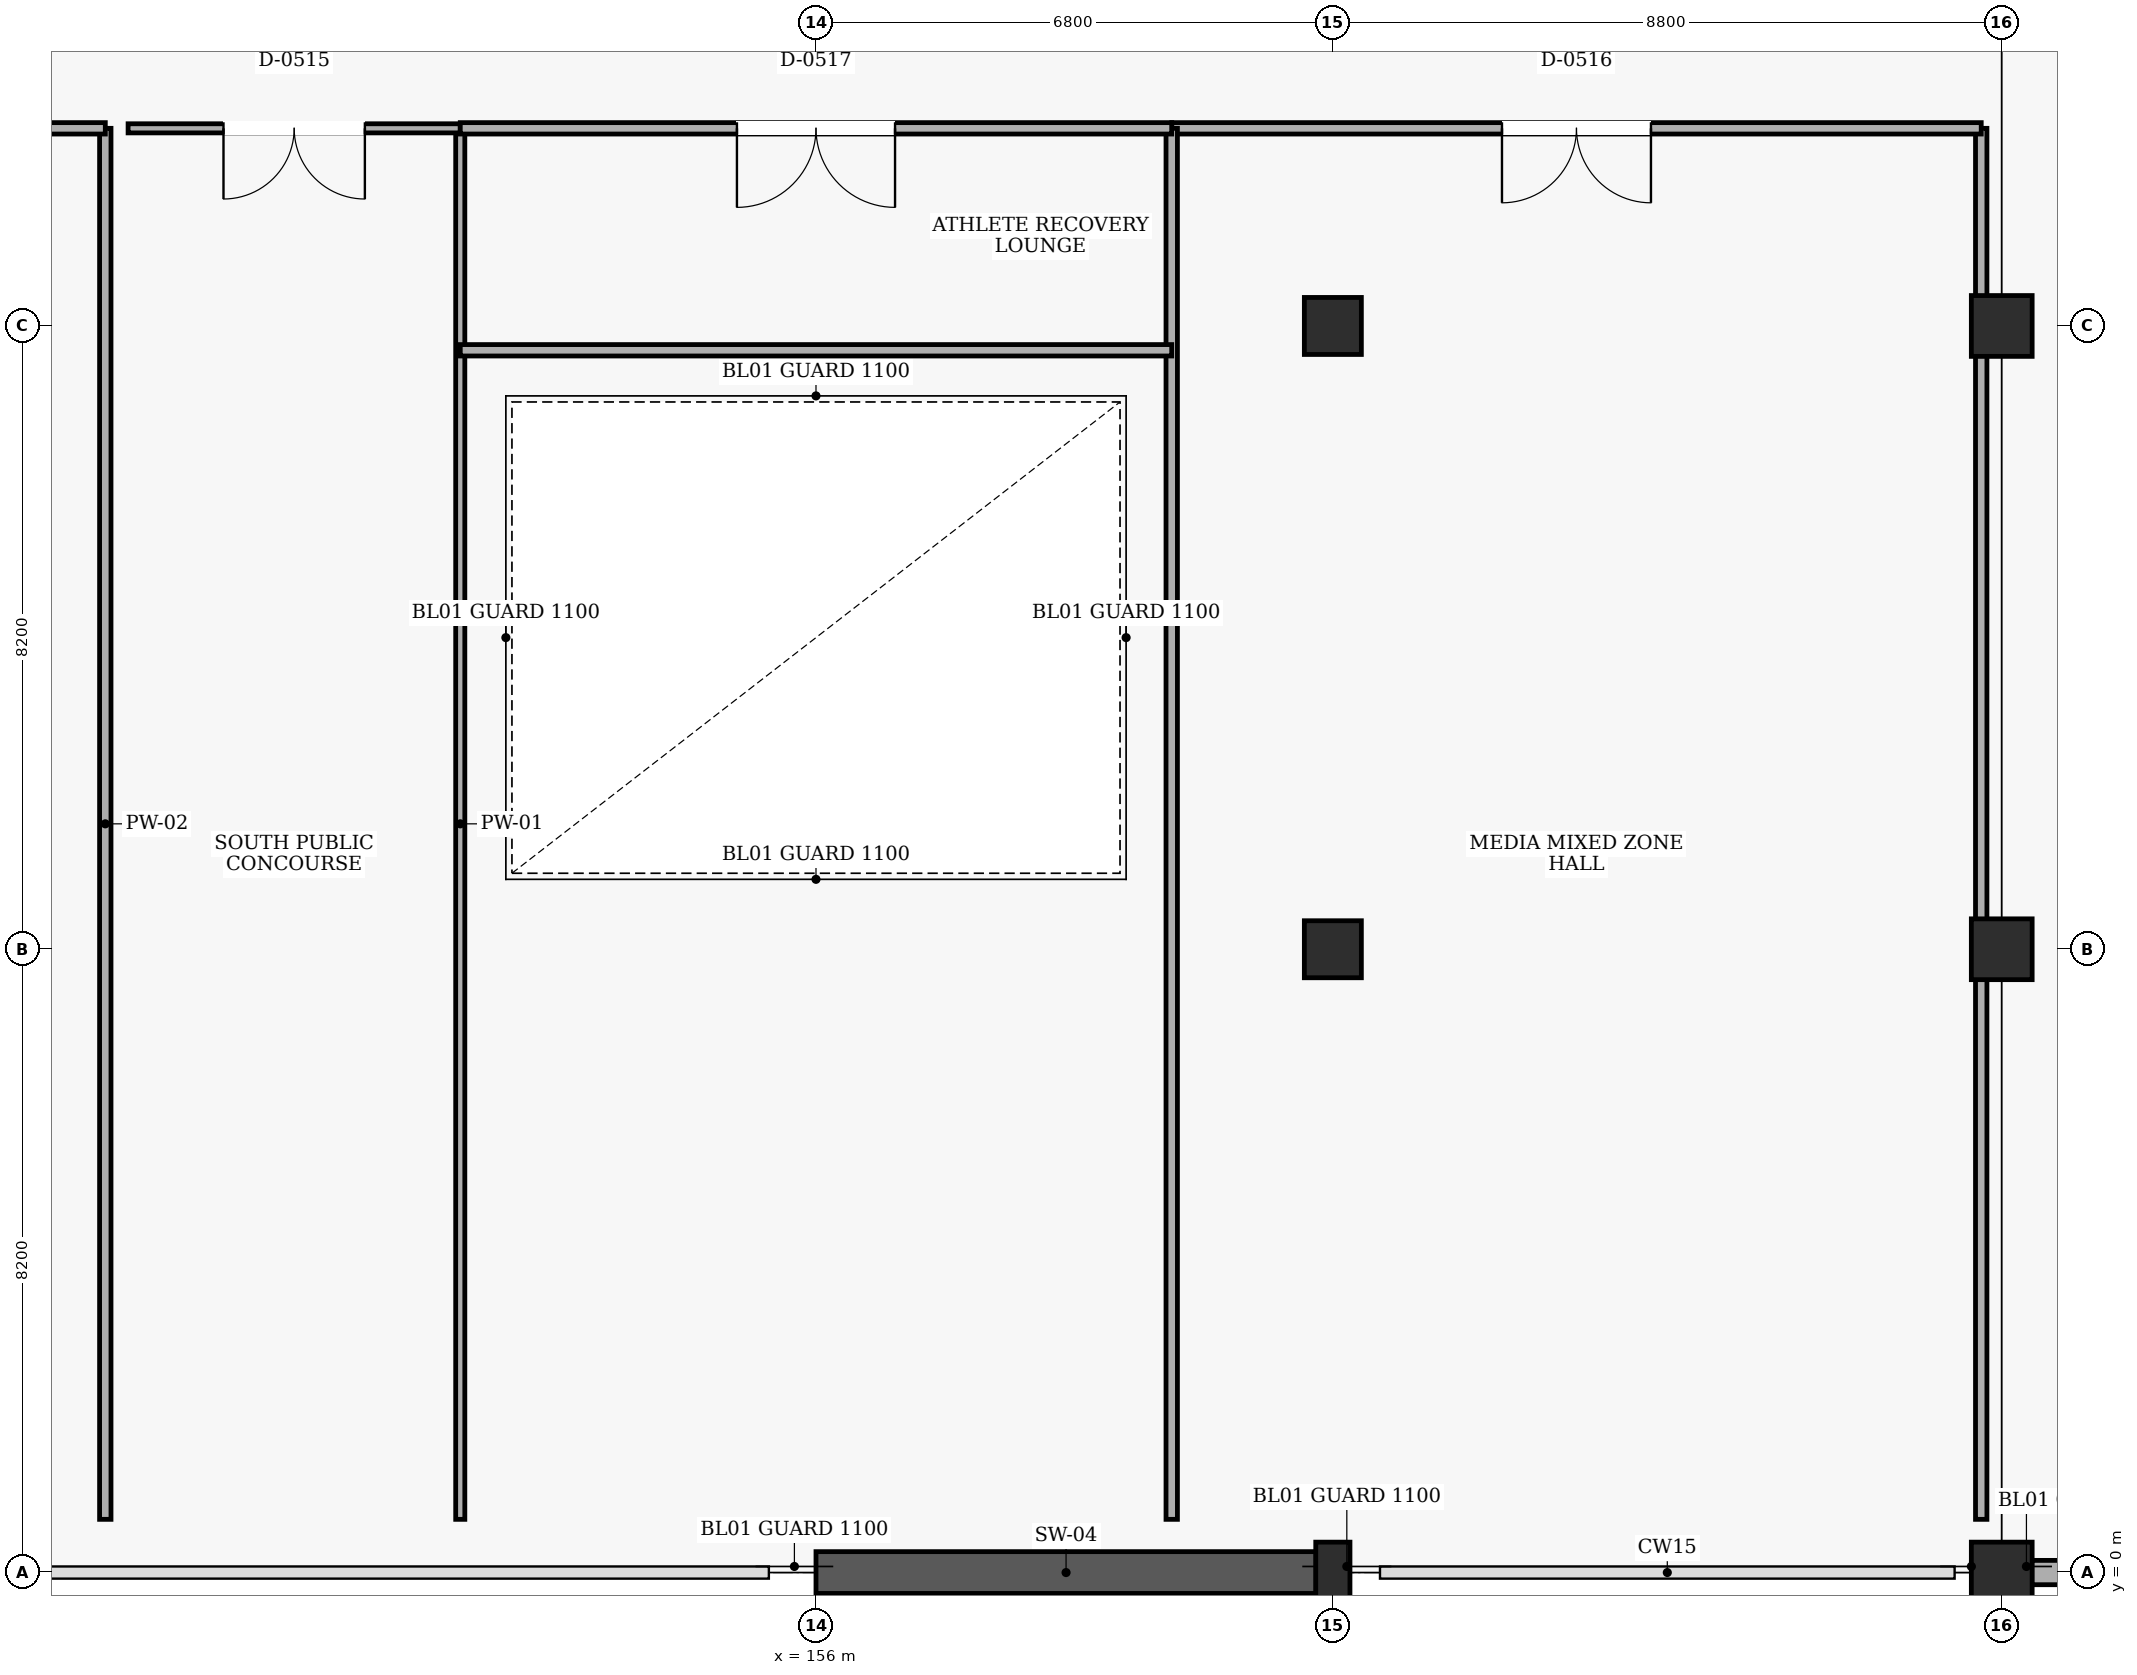
"""IFC4 building model, lengths in metres.
Left out: names, types, materials, properties, quantities, classifications, styles, units other than length and angle.
Written with IfcOpenShell. Run it as: python <this file> out.ifc"""

import sys

from ifc_helpers import new_model, si_unit, direction, frame, frame_2d, origin, origin_2d, place, context, subcontext, project, spatial, rectangle, extrude, element, fill, save


model = new_model("IFC4")
c1 = context("Model", 3, precision=1e-05, world=origin(), true_north=direction((0.0, 1.0)))
c2 = subcontext(c1, "Body", "Model", "MODEL_VIEW")
j1 = project(units=[si_unit("LENGTHUNIT", "METRE"), si_unit("PLANEANGLEUNIT", "RADIAN")], contexts=[c1])
p1 = place(None, origin())
s1 = spatial("IfcSite", under=j1, at=p1, CompositionType="ELEMENT")
p2 = place(p1, origin())
s2 = spatial("IfcBuilding", under=s1, at=p2, CompositionType="ELEMENT")
p3 = place(p2, frame((0.0, 0.0, 5.4)))
s3 = spatial("IfcBuildingStorey", under=s2, at=p3, CompositionType="ELEMENT", Elevation=5.4)
p4 = place(p3, frame((162.8, 0.0, 0.0), z_axis=(0.0, 0.0, 1.0), x_axis=(1.0, 0.0, 0.0)))
e1 = element("IfcColumn", 1, at=p4, inside=s3, PredefinedType="PILASTER", context=c2, shape_type="SweptSolid", body=[
    extrude(rectangle(XDim=0.45, YDim=0.8, at=origin_2d()), origin(), (0.0, 0.0, 1.0), 4.8),
])
for number, where, z_axis, x_axis in (
    (2, (162.8, 8.2, 0.0), (0.0, 0.0, 1.0), (1.0, 0.0, 0.0)),
    (3, (162.8, 16.4, 0.0), (0.0, 0.0, 1.0), (1.0, 0.0, 0.0)),
):
    element("IfcColumn", number, at=place(p3, frame(where, z_axis=z_axis, x_axis=x_axis)), inside=s3, PredefinedType="COLUMN", context=c2, shape_type="SweptSolid", body=[
        extrude(rectangle(XDim=0.75, YDim=0.75, at=origin_2d()), origin(), (0.0, 0.0, 1.0), 4.8),
    ])
for number, where, z_axis, x_axis in (
    (4, (171.6, 0.0, 0.0), (0.0, 0.0, 1.0), (1.0, 0.0, 0.0)),
    (5, (171.6, 8.2, 0.0), (0.0, 0.0, 1.0), (1.0, 0.0, 0.0)),
    (6, (171.6, 16.4, 0.0), (0.0, 0.0, 1.0), (1.0, 0.0, 0.0)),
):
    element("IfcColumn", number, at=place(p3, frame(where, z_axis=z_axis, x_axis=x_axis)), inside=s3, PredefinedType="COLUMN", context=c2, shape_type="SweptSolid", body=[
        extrude(rectangle(XDim=0.8, YDim=0.8, at=origin_2d()), origin(), (0.0, 0.0, 1.0), 4.8),
    ])
p5 = place(p3, frame((179.98, 0.0, 0.0), z_axis=(0.0, 0.0, 1.0), x_axis=(-1.0, 0.0, 0.0)))
e7 = element("IfcWall", 7, at=p5, inside=s3, PredefinedType="SOLIDWALL", context=c2, shape_type="SweptSolid", body=[
    extrude(rectangle(XDim=7.985, YDim=0.32, at=frame_2d((3.992, 0.0))), origin(), (0.0, 0.0, 1.0), 3.68),
])
p6 = place(p5, frame((3.093, 0.0, 0.9)))
e8 = element("IfcOpeningElement", 8, at=p6, cuts=e7, PredefinedType="OPENING", context=c2, shape_type="SweptSolid", body=[
    extrude(rectangle(XDim=1.8, YDim=1.5, at=frame_2d((0.9, 0.75))), frame((0.0, 0.17, 0.0), z_axis=(0.0, -1.0, 0.0), x_axis=(1.0, 0.0, 0.0)), (0.0, 0.0, 1.0), 0.34),
])
p7 = place(p3, frame((162.58, 0.0, 0.0), z_axis=(0.0, 0.0, 1.0), x_axis=(-1.0, 0.0, 0.0)))
e9 = element("IfcWall", 9, at=p7, inside=s3, PredefinedType="SHEAR", context=c2, shape_type="SweptSolid", body=[
    extrude(rectangle(XDim=6.58, YDim=0.55, at=frame_2d((3.29, 0.0))), origin(), (0.0, 0.0, 1.0), 4.48),
])
p8 = place(p3, frame((146.65, 0.7, 0.0), z_axis=(0.0, 0.0, 1.0), x_axis=(0.0, 1.0, 0.0)))
e10 = element("IfcWall", 10, at=p8, inside=s3, PredefinedType="PARTITIONING", context=c2, shape_type="SweptSolid", body=[
    extrude(rectangle(XDim=18.3, YDim=0.15, at=frame_2d((9.15, 0.0))), origin(), (0.0, 0.0, 1.0), 4.5),
])
p9 = place(p3, frame((146.65, 19.0, 0.0), z_axis=(0.0, 0.0, 1.0), x_axis=(-1.0, 0.0, 0.0)))
e11 = element("IfcWall", 11, at=p9, inside=s3, PredefinedType="PARTITIONING", context=c2, shape_type="SweptSolid", body=[
    extrude(rectangle(XDim=24.38, YDim=0.15, at=frame_2d((12.19, 0.0))), origin(), (0.0, 0.0, 1.0), 4.5),
])
p10 = place(p9, frame((11.31, 0.0, 0.0)))
e12 = element("IfcOpeningElement", 12, at=p10, cuts=e11, PredefinedType="OPENING", context=c2, shape_type="SweptSolid", body=[
    extrude(rectangle(XDim=1.76, YDim=2.25, at=frame_2d((0.88, 1.125))), frame((0.0, 0.085, 0.0), z_axis=(0.0, -1.0, 0.0), x_axis=(1.0, 0.0, 0.0)), (0.0, 0.0, 1.0), 0.17),
])
p11 = place(p3, frame((151.32, 0.7, 0.0), z_axis=(0.0, 0.0, 1.0), x_axis=(0.0, 1.0, 0.0)))
e13 = element("IfcWall", 13, at=p11, inside=s3, PredefinedType="PARTITIONING", context=c2, shape_type="SweptSolid", body=[
    extrude(rectangle(XDim=18.3, YDim=0.12, at=frame_2d((9.15, 0.0))), origin(), (0.0, 0.0, 1.0), 4.5),
])
p12 = place(p3, frame((151.32, 19.0, 0.0), z_axis=(0.0, 0.0, 1.0), x_axis=(-1.0, 0.0, 0.0)))
e14 = element("IfcWall", 14, at=p12, inside=s3, PredefinedType="PARTITIONING", context=c2, shape_type="SweptSolid", body=[
    extrude(rectangle(XDim=4.37, YDim=0.12, at=frame_2d((2.185, 0.0))), origin(), (0.0, 0.0, 1.0), 4.5),
])
p13 = place(p12, frame((1.255, 0.0, 0.0)))
e15 = element("IfcOpeningElement", 15, at=p13, cuts=e14, PredefinedType="OPENING", context=c2, shape_type="SweptSolid", body=[
    extrude(rectangle(XDim=1.86, YDim=2.3, at=frame_2d((0.93, 1.15))), frame((0.0, 0.07, 0.0), z_axis=(0.0, -1.0, 0.0), x_axis=(1.0, 0.0, 0.0)), (0.0, 0.0, 1.0), 0.14),
])
p14 = place(p3, frame((171.33, 0.7, 0.0), z_axis=(0.0, 0.0, 1.0), x_axis=(0.0, 1.0, 0.0)))
e16 = element("IfcWall", 16, at=p14, inside=s3, PredefinedType="PARTITIONING", context=c2, shape_type="SweptSolid", body=[
    extrude(rectangle(XDim=18.3, YDim=0.15, at=frame_2d((9.15, 0.0))), origin(), (0.0, 0.0, 1.0), 3.78),
])
p15 = place(p3, frame((171.33, 19.0, 0.0), z_axis=(0.0, 0.0, 1.0), x_axis=(-1.0, 0.0, 0.0)))
e17 = element("IfcWall", 17, at=p15, inside=s3, PredefinedType="PARTITIONING", context=c2, shape_type="SweptSolid", body=[
    extrude(rectangle(XDim=10.65, YDim=0.15, at=frame_2d((5.325, 0.0))), origin(), (0.0, 0.0, 1.0), 4.5),
])
p16 = place(p15, frame((4.345, 0.0, 0.0)))
e18 = element("IfcOpeningElement", 18, at=p16, cuts=e17, PredefinedType="OPENING", context=c2, shape_type="SweptSolid", body=[
    extrude(rectangle(XDim=1.96, YDim=2.3, at=frame_2d((0.98, 1.15))), frame((0.0, 0.085, 0.0), z_axis=(0.0, -1.0, 0.0), x_axis=(1.0, 0.0, 0.0)), (0.0, 0.0, 1.0), 0.17),
])
p17 = place(p3, frame((160.68, 19.0, 0.0), z_axis=(0.0, 0.0, 1.0), x_axis=(0.0, -1.0, 0.0)))
e19 = element("IfcWall", 19, at=p17, inside=s3, PredefinedType="PARTITIONING", context=c2, shape_type="SweptSolid", body=[
    extrude(rectangle(XDim=18.3, YDim=0.15, at=frame_2d((9.15, 0.0))), origin(), (0.0, 0.0, 1.0), 4.5),
])
p18 = place(p3, frame((151.32, 16.08, 0.0), z_axis=(0.0, 0.0, 1.0), x_axis=(1.0, 0.0, 0.0)))
e20 = element("IfcWall", 20, at=p18, inside=s3, PredefinedType="PARTITIONING", context=c2, shape_type="SweptSolid", body=[
    extrude(rectangle(XDim=9.36, YDim=0.15, at=frame_2d((4.68, 0.0))), origin(), (0.0, 0.0, 1.0), 4.5),
])
p19 = place(p3, frame((160.68, 19.0, 0.0), z_axis=(0.0, 0.0, 1.0), x_axis=(-1.0, 0.0, 0.0)))
e21 = element("IfcWall", 21, at=p19, inside=s3, PredefinedType="PARTITIONING", context=c2, shape_type="SweptSolid", body=[
    extrude(rectangle(XDim=9.36, YDim=0.15, at=frame_2d((4.68, 0.0))), origin(), (0.0, 0.0, 1.0), 4.5),
])
p20 = place(p19, frame((3.64, 0.0, 0.0)))
e22 = element("IfcOpeningElement", 22, at=p20, cuts=e21, PredefinedType="OPENING", context=c2, shape_type="SweptSolid", body=[
    extrude(rectangle(XDim=2.08, YDim=2.35, at=frame_2d((1.04, 1.175))), frame((0.0, 0.085, 0.0), z_axis=(0.0, -1.0, 0.0), x_axis=(1.0, 0.0, 0.0)), (0.0, 0.0, 1.0), 0.17),
])
p21 = place(p13, origin())
e23 = element("IfcDoor", 23, at=p21, inside=s3, OperationType="DOUBLE_DOOR_SINGLE_SWING", PredefinedType="DOOR", context=c2, shape_type="SweptSolid", body=[
    extrude(rectangle(XDim=1.86, YDim=2.3, at=frame_2d((0.93, 1.15))), frame((0.0, 0.025, 0.0), z_axis=(0.0, -1.0, 0.0), x_axis=(1.0, 0.0, 0.0)), (0.0, 0.0, 1.0), 0.05),
])
fill(e15, e23)
p22 = place(p16, origin())
e24 = element("IfcDoor", 24, at=p22, inside=s3, OperationType="DOUBLE_DOOR_SINGLE_SWING", PredefinedType="DOOR", context=c2, shape_type="SweptSolid", body=[
    extrude(rectangle(XDim=1.96, YDim=2.3, at=frame_2d((0.98, 1.15))), frame((0.0, 0.025, 0.0), z_axis=(0.0, -1.0, 0.0), x_axis=(1.0, 0.0, 0.0)), (0.0, 0.0, 1.0), 0.05),
])
fill(e18, e24)
p23 = place(p20, origin())
e25 = element("IfcDoor", 25, at=p23, inside=s3, OperationType="DOUBLE_DOOR_SINGLE_SWING", PredefinedType="DOOR", context=c2, shape_type="SweptSolid", body=[
    extrude(rectangle(XDim=2.08, YDim=2.35, at=frame_2d((1.04, 1.175))), frame((0.0, 0.025, 0.0), z_axis=(0.0, -1.0, 0.0), x_axis=(1.0, 0.0, 0.0)), (0.0, 0.0, 1.0), 0.05),
])
fill(e22, e25)
save(model, sys.argv[1])
